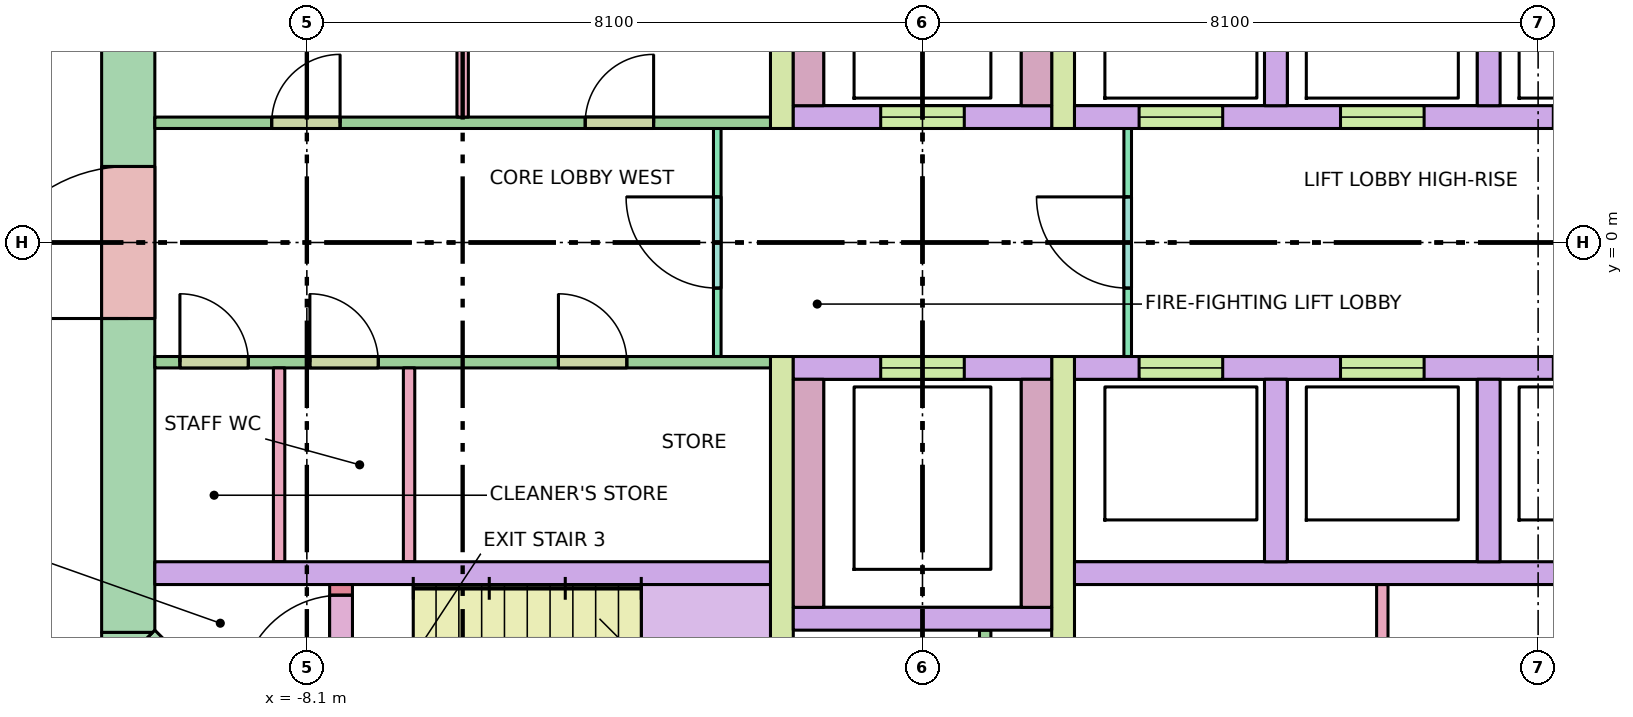
"""IFC4 building model, lengths in metres.
Left out: names, types, materials, properties, quantities, classifications, styles, units other than length and angle.
Written with IfcOpenShell. Run it as: python <this file> out.ifc"""

import sys

from ifc_helpers import new_model, si_unit, direction, frame, frame_2d, origin, place, context, subcontext, project, spatial, polyline, rectangle, outline, extrude, element, fill, save


model = new_model("IFC4")
c1 = context("Model", 3, precision=1e-05, world=origin(), true_north=direction((0.0, 1.0)))
c2 = subcontext(c1, "Body", "Model", "MODEL_VIEW")
j1 = project(units=[si_unit("LENGTHUNIT", "METRE"), si_unit("PLANEANGLEUNIT", "RADIAN")], contexts=[c1])
p1 = place(None, origin())
s1 = spatial("IfcSite", under=j1, at=p1, CompositionType="ELEMENT")
p2 = place(p1, origin())
s2 = spatial("IfcBuilding", under=s1, at=p2, CompositionType="ELEMENT")
p3 = place(p2, frame((0.0, 0.0, 154.2)))
s3 = spatial("IfcBuildingStorey", under=s2, at=p3, CompositionType="ELEMENT", Elevation=154.2)
p4 = place(p3, frame((-10.45, -5.13, -0.28), z_axis=(0.0, 0.0, 1.0), x_axis=(0.0, 1.0, 0.0)))
e1 = element("IfcWall", 1, at=p4, inside=s3, PredefinedType="SHEAR", context=c2, shape_type="SweptSolid", body=[
    extrude(rectangle(XDim=10.26, YDim=0.7, at=frame_2d((5.13, 0.0))), origin(), (0.0, 0.0, 1.0), 3.7),
])
p5 = place(p4, frame((4.13, 0.0, 0.28)))
e2 = element("IfcOpeningElement", 2, at=p5, cuts=e1, PredefinedType="OPENING", context=c2, shape_type="SweptSolid", body=[
    extrude(rectangle(XDim=2.0, YDim=2.1, at=frame_2d((1.0, 1.05))), frame((0.0, 0.36, 0.0), z_axis=(0.0, -1.0, 0.0), x_axis=(1.0, 0.0, 0.0)), (0.0, 0.0, 1.0), 0.72),
])
p6 = place(p3, frame((10.347, -5.347, -0.28), z_axis=(0.0, 0.0, 1.0), x_axis=(-0.707106781187, -0.707106781187, 0.0)))
e3 = element("IfcWall", 3, at=p6, inside=s3, PredefinedType="SHEAR", context=c2, shape_type="SweptSolid", body=[
    extrude(rectangle(XDim=4.243, YDim=0.7, at=frame_2d((2.121, 0.0))), origin(), (0.0, 0.0, 1.0), 3.7),
])
p7 = place(p6, frame((0.52, 0.0, 0.28)))
e4 = element("IfcOpeningElement", 4, at=p7, cuts=e3, PredefinedType="OPENING", context=c2, shape_type="SweptSolid", body=[
    extrude(rectangle(XDim=0.9, YDim=2.1, at=frame_2d((0.45, 1.05))), frame((0.0, 0.36, 0.0), z_axis=(0.0, -1.0, 0.0), x_axis=(1.0, 0.0, 0.0)), (0.0, 0.0, 1.0), 0.72),
])
p8 = place(p3, frame((-7.347, -8.347, -0.28), z_axis=(0.0, 0.0, 1.0), x_axis=(-0.707106781187, 0.707106781187, 0.0)))
e5 = element("IfcWall", 5, at=p8, inside=s3, PredefinedType="SHEAR", context=c2, shape_type="SweptSolid", body=[
    extrude(rectangle(XDim=4.243, YDim=0.7, at=frame_2d((2.121, 0.0))), origin(), (0.0, 0.0, 1.0), 3.7),
])
p9 = place(p8, frame((2.393, 0.0, 0.28)))
e6 = element("IfcOpeningElement", 6, at=p9, cuts=e5, PredefinedType="OPENING", context=c2, shape_type="SweptSolid", body=[
    extrude(rectangle(XDim=1.2, YDim=2.1, at=frame_2d((0.6, 1.05))), frame((0.0, 0.36, 0.0), z_axis=(0.0, -1.0, 0.0), x_axis=(1.0, 0.0, 0.0)), (0.0, 0.0, 1.0), 0.72),
])
p10 = place(p3, frame((0.0, 0.0, -0.28)))
e7 = element("IfcWall", 7, at=p10, inside=s3, PredefinedType="SHEAR", context=c2, shape_type="SweptSolid", body=[
    extrude(outline(polyline([(-10.8, -5.39), (-10.8, -5.13), (-10.8, -5.13), (-10.13, -5.13), (-10.595, -5.595), (-10.595, -5.595), (-10.595, -5.595), (-10.8, -5.39)])), origin(), (0.0, 0.0, 1.0), 3.7),
])
for number, where, z_axis, x_axis in (
    (8, (-10.1, -4.35, 0.0), (0.0, 0.0, 1.0), (1.0, 0.0, 0.0)),
    (9, (2.0, -4.35, 0.0), (0.0, 0.0, 1.0), (1.0, 0.0, 0.0)),
):
    element("IfcWall", number, at=place(p3, frame(where, z_axis=z_axis, x_axis=x_axis)), inside=s3, PredefinedType="SOLIDWALL", context=c2, shape_type="SweptSolid", body=[
        extrude(rectangle(XDim=8.1, YDim=0.3, at=frame_2d((4.05, 0.0))), origin(), (0.0, 0.0, 1.0), 3.42),
    ])
p11 = place(p3, frame((2.0, 1.65, 0.0), z_axis=(0.0, 0.0, 1.0), x_axis=(1.0, 0.0, 0.0)))
e10 = element("IfcWall", 10, at=p11, inside=s3, PredefinedType="SOLIDWALL", context=c2, shape_type="SweptSolid", body=[
    extrude(rectangle(XDim=8.1, YDim=0.3, at=frame_2d((4.05, 0.0))), origin(), (0.0, 0.0, 1.0), 3.42),
])
p12 = place(p11, frame((0.85, 0.0, 0.0)))
e11 = element("IfcOpeningElement", 11, at=p12, cuts=e10, PredefinedType="OPENING", context=c2, shape_type="SweptSolid", body=[
    extrude(rectangle(XDim=1.1, YDim=2.1, at=frame_2d((0.55, 1.05))), frame((0.0, 0.16, 0.0), z_axis=(0.0, -1.0, 0.0), x_axis=(1.0, 0.0, 0.0)), (0.0, 0.0, 1.0), 0.32),
])
p13 = place(p11, frame((3.5, 0.0, 0.0)))
e12 = element("IfcOpeningElement", 12, at=p13, cuts=e10, PredefinedType="OPENING", context=c2, shape_type="SweptSolid", body=[
    extrude(rectangle(XDim=1.1, YDim=2.1, at=frame_2d((0.55, 1.05))), frame((0.0, 0.16, 0.0), z_axis=(0.0, -1.0, 0.0), x_axis=(1.0, 0.0, 0.0)), (0.0, 0.0, 1.0), 0.32),
])
p14 = place(p11, frame((6.3, 0.0, 0.0)))
e13 = element("IfcOpeningElement", 13, at=p14, cuts=e10, PredefinedType="OPENING", context=c2, shape_type="SweptSolid", body=[
    extrude(rectangle(XDim=1.1, YDim=2.1, at=frame_2d((0.55, 1.05))), frame((0.0, 0.16, 0.0), z_axis=(0.0, -1.0, 0.0), x_axis=(1.0, 0.0, 0.0)), (0.0, 0.0, 1.0), 0.32),
])
p15 = place(p3, frame((2.0, -1.65, 0.0), z_axis=(0.0, 0.0, 1.0), x_axis=(1.0, 0.0, 0.0)))
e14 = element("IfcWall", 14, at=p15, inside=s3, PredefinedType="SOLIDWALL", context=c2, shape_type="SweptSolid", body=[
    extrude(rectangle(XDim=8.1, YDim=0.3, at=frame_2d((4.05, 0.0))), origin(), (0.0, 0.0, 1.0), 3.42),
])
p16 = place(p15, frame((0.85, 0.0, 0.0)))
e15 = element("IfcOpeningElement", 15, at=p16, cuts=e14, PredefinedType="OPENING", context=c2, shape_type="SweptSolid", body=[
    extrude(rectangle(XDim=1.1, YDim=2.1, at=frame_2d((0.55, 1.05))), frame((0.0, 0.16, 0.0), z_axis=(0.0, -1.0, 0.0), x_axis=(1.0, 0.0, 0.0)), (0.0, 0.0, 1.0), 0.32),
])
p17 = place(p15, frame((3.5, 0.0, 0.0)))
e16 = element("IfcOpeningElement", 16, at=p17, cuts=e14, PredefinedType="OPENING", context=c2, shape_type="SweptSolid", body=[
    extrude(rectangle(XDim=1.1, YDim=2.1, at=frame_2d((0.55, 1.05))), frame((0.0, 0.16, 0.0), z_axis=(0.0, -1.0, 0.0), x_axis=(1.0, 0.0, 0.0)), (0.0, 0.0, 1.0), 0.32),
])
p18 = place(p15, frame((6.3, 0.0, 0.0)))
e17 = element("IfcOpeningElement", 17, at=p18, cuts=e14, PredefinedType="OPENING", context=c2, shape_type="SweptSolid", body=[
    extrude(rectangle(XDim=1.1, YDim=2.1, at=frame_2d((0.55, 1.05))), frame((0.0, 0.16, 0.0), z_axis=(0.0, -1.0, 0.0), x_axis=(1.0, 0.0, 0.0)), (0.0, 0.0, 1.0), 0.32),
])
for number, where, z_axis, x_axis in (
    (18, (4.65, 1.8, 0.0), (0.0, 0.0, 1.0), (0.0, 1.0, 0.0)),
    (19, (4.65, -4.2, 0.0), (0.0, 0.0, 1.0), (0.0, 1.0, 0.0)),
    (20, (7.45, 1.8, 0.0), (0.0, 0.0, 1.0), (0.0, 1.0, 0.0)),
    (21, (7.45, -4.2, 0.0), (0.0, 0.0, 1.0), (0.0, 1.0, 0.0)),
):
    element("IfcWall", number, at=place(p3, frame(where, z_axis=z_axis, x_axis=x_axis)), inside=s3, PredefinedType="SOLIDWALL", context=c2, shape_type="SweptSolid", body=[
        extrude(rectangle(XDim=2.4, YDim=0.3, at=frame_2d((1.2, 0.0))), origin(), (0.0, 0.0, 1.0), 3.42),
    ])
for number, where, z_axis, x_axis in (
    (22, (-1.85, 1.5, 0.0), (0.0, 0.0, 1.0), (0.0, 1.0, 0.0)),
    (23, (-1.85, -8.1, 0.0), (0.0, 0.0, 1.0), (0.0, 1.0, 0.0)),
    (24, (1.85, 1.5, 0.0), (0.0, 0.0, 1.0), (0.0, 1.0, 0.0)),
    (25, (1.85, -8.1, 0.0), (0.0, 0.0, 1.0), (0.0, 1.0, 0.0)),
):
    element("IfcWall", number, at=place(p3, frame(where, z_axis=z_axis, x_axis=x_axis)), inside=s3, PredefinedType="SHEAR", context=c2, shape_type="SweptSolid", body=[
        extrude(rectangle(XDim=6.6, YDim=0.3, at=frame_2d((3.3, 0.0))), origin(), (0.0, 0.0, 1.0), 3.42),
    ])
p19 = place(p3, frame((-1.7, 1.65, 0.0), z_axis=(0.0, 0.0, 1.0), x_axis=(1.0, 0.0, 0.0)))
e26 = element("IfcWall", 26, at=p19, inside=s3, PredefinedType="SOLIDWALL", context=c2, shape_type="SweptSolid", body=[
    extrude(rectangle(XDim=3.4, YDim=0.3, at=frame_2d((1.7, 0.0))), origin(), (0.0, 0.0, 1.0), 3.42),
])
p20 = place(p19, frame((1.15, 0.0, 0.0)))
e27 = element("IfcOpeningElement", 27, at=p20, cuts=e26, PredefinedType="OPENING", context=c2, shape_type="SweptSolid", body=[
    extrude(rectangle(XDim=1.1, YDim=2.1, at=frame_2d((0.55, 1.05))), frame((0.0, 0.16, 0.0), z_axis=(0.0, -1.0, 0.0), x_axis=(1.0, 0.0, 0.0)), (0.0, 0.0, 1.0), 0.32),
])
p21 = place(p3, frame((-1.7, -1.65, 0.0), z_axis=(0.0, 0.0, 1.0), x_axis=(1.0, 0.0, 0.0)))
e28 = element("IfcWall", 28, at=p21, inside=s3, PredefinedType="SOLIDWALL", context=c2, shape_type="SweptSolid", body=[
    extrude(rectangle(XDim=3.4, YDim=0.3, at=frame_2d((1.7, 0.0))), origin(), (0.0, 0.0, 1.0), 3.42),
])
p22 = place(p21, frame((1.15, 0.0, 0.0)))
e29 = element("IfcOpeningElement", 29, at=p22, cuts=e28, PredefinedType="OPENING", context=c2, shape_type="SweptSolid", body=[
    extrude(rectangle(XDim=1.1, YDim=2.1, at=frame_2d((0.55, 1.05))), frame((0.0, 0.16, 0.0), z_axis=(0.0, -1.0, 0.0), x_axis=(1.0, 0.0, 0.0)), (0.0, 0.0, 1.0), 0.32),
])
for number, where, z_axis, x_axis in (
    (30, (-1.5, 1.8, 0.0), (0.0, 0.0, 1.0), (0.0, 1.0, 0.0)),
    (31, (-1.5, -4.8, 0.0), (0.0, 0.0, 1.0), (0.0, 1.0, 0.0)),
    (32, (1.5, 1.8, 0.0), (0.0, 0.0, 1.0), (0.0, 1.0, 0.0)),
    (33, (1.5, -4.8, 0.0), (0.0, 0.0, 1.0), (0.0, 1.0, 0.0)),
):
    element("IfcWall", number, at=place(p3, frame(where, z_axis=z_axis, x_axis=x_axis)), inside=s3, PredefinedType="SOLIDWALL", context=c2, shape_type="SweptSolid", body=[
        extrude(rectangle(XDim=3.0, YDim=0.4, at=frame_2d((1.5, 0.0))), origin(), (0.0, 0.0, 1.0), 3.42),
    ])
p23 = place(p3, frame((-1.7, -4.95, 0.0), z_axis=(0.0, 0.0, 1.0), x_axis=(1.0, 0.0, 0.0)))
e34 = element("IfcWall", 34, at=p23, inside=s3, PredefinedType="SOLIDWALL", context=c2, shape_type="SweptSolid", body=[
    extrude(rectangle(XDim=3.4, YDim=0.3, at=frame_2d((1.7, 0.0))), origin(), (0.0, 0.0, 1.0), 3.42),
])
p24 = place(p3, frame((-7.65, -7.64, 0.0), z_axis=(0.0, 0.0, 1.0), x_axis=(0.0, 1.0, 0.0)))
e35 = element("IfcWall", 35, at=p24, inside=s3, PredefinedType="SHEAR", context=c2, shape_type="SweptSolid", body=[
    extrude(rectangle(XDim=3.14, YDim=0.3, at=frame_2d((1.57, 0.0))), origin(), (0.0, 0.0, 1.0), 3.42),
])
p25 = place(p24, frame((1.68, 0.0, 0.0)))
e36 = element("IfcOpeningElement", 36, at=p25, cuts=e35, PredefinedType="OPENING", context=c2, shape_type="SweptSolid", body=[
    extrude(rectangle(XDim=1.32, YDim=2.1, at=frame_2d((0.66, 1.05))), frame((0.0, 0.16, 0.0), z_axis=(0.0, -1.0, 0.0), x_axis=(1.0, 0.0, 0.0)), (0.0, 0.0, 1.0), 0.32),
])
p26 = place(p3, frame((-2.7, -1.5, 0.0), z_axis=(0.0, 0.0, 1.0), x_axis=(0.0, 1.0, 0.0)))
e37 = element("IfcWall", 37, at=p26, inside=s3, PredefinedType="PARTITIONING", context=c2, shape_type="SweptSolid", body=[
    extrude(rectangle(XDim=3.0, YDim=0.1, at=frame_2d((1.5, 0.0))), origin(), (0.0, 0.0, 1.0), 3.42),
])
p27 = place(p26, frame((0.9, 0.0, 0.0)))
e38 = element("IfcOpeningElement", 38, at=p27, cuts=e37, PredefinedType="OPENING", context=c2, shape_type="SweptSolid", body=[
    extrude(rectangle(XDim=1.2, YDim=2.1, at=frame_2d((0.6, 1.05))), frame((0.0, 0.06, 0.0), z_axis=(0.0, -1.0, 0.0), x_axis=(1.0, 0.0, 0.0)), (0.0, 0.0, 1.0), 0.12),
])
p28 = place(p3, frame((2.7, -1.5, 0.0), z_axis=(0.0, 0.0, 1.0), x_axis=(0.0, 1.0, 0.0)))
e39 = element("IfcWall", 39, at=p28, inside=s3, PredefinedType="PARTITIONING", context=c2, shape_type="SweptSolid", body=[
    extrude(rectangle(XDim=3.0, YDim=0.1, at=frame_2d((1.5, 0.0))), origin(), (0.0, 0.0, 1.0), 3.42),
])
p29 = place(p28, frame((0.9, 0.0, 0.0)))
e40 = element("IfcOpeningElement", 40, at=p29, cuts=e39, PredefinedType="OPENING", context=c2, shape_type="SweptSolid", body=[
    extrude(rectangle(XDim=1.2, YDim=2.1, at=frame_2d((0.6, 1.05))), frame((0.0, 0.06, 0.0), z_axis=(0.0, -1.0, 0.0), x_axis=(1.0, 0.0, 0.0)), (0.0, 0.0, 1.0), 0.12),
])
p30 = place(p3, frame((0.825, -8.1, 0.0), z_axis=(0.0, 0.0, 1.0), x_axis=(0.0, 1.0, 0.0)))
e41 = element("IfcWall", 41, at=p30, inside=s3, PredefinedType="PARTITIONING", context=c2, shape_type="SweptSolid", body=[
    extrude(rectangle(XDim=3.0, YDim=0.15, at=frame_2d((1.5, 0.0))), origin(), (0.0, 0.0, 1.0), 3.42),
])
p31 = place(p3, frame((6.05, -8.1, 0.0), z_axis=(0.0, 0.0, 1.0), x_axis=(0.0, 1.0, 0.0)))
e42 = element("IfcWall", 42, at=p31, inside=s3, PredefinedType="PARTITIONING", context=c2, shape_type="SweptSolid", body=[
    extrude(rectangle(XDim=3.6, YDim=0.15, at=frame_2d((1.8, 0.0))), origin(), (0.0, 0.0, 1.0), 3.42),
])
for number, where, z_axis, x_axis in (
    (43, (-6.05, 1.65, 0.0), (0.0, 0.0, 1.0), (0.0, 1.0, 0.0)),
    (44, (-8.465, -4.2, 0.0), (0.0, 0.0, 1.0), (0.0, 1.0, 0.0)),
    (45, (-6.755, -4.2, 0.0), (0.0, 0.0, 1.0), (0.0, 1.0, 0.0)),
):
    element("IfcWall", number, at=place(p3, frame(where, z_axis=z_axis, x_axis=x_axis)), inside=s3, PredefinedType="PARTITIONING", context=c2, shape_type="SweptSolid", body=[
        extrude(rectangle(XDim=2.55, YDim=0.15, at=frame_2d((1.275, 0.0))), origin(), (0.0, 0.0, 1.0), 3.42),
    ])
p32 = place(p3, frame((-10.1, 1.575, 0.0), z_axis=(0.0, 0.0, 1.0), x_axis=(1.0, 0.0, 0.0)))
e46 = element("IfcWall", 46, at=p32, inside=s3, PredefinedType="PARTITIONING", context=c2, shape_type="SweptSolid", body=[
    extrude(rectangle(XDim=8.1, YDim=0.15, at=frame_2d((4.05, 0.0))), origin(), (0.0, 0.0, 1.0), 3.42),
])
p33 = place(p32, frame((1.538, 0.0, 0.0)))
e47 = element("IfcOpeningElement", 47, at=p33, cuts=e46, PredefinedType="OPENING", context=c2, shape_type="SweptSolid", body=[
    extrude(rectangle(XDim=0.9, YDim=2.1, at=frame_2d((0.45, 1.05))), frame((0.0, 0.085, 0.0), z_axis=(0.0, -1.0, 0.0), x_axis=(1.0, 0.0, 0.0)), (0.0, 0.0, 1.0), 0.17),
])
p34 = place(p32, frame((5.663, 0.0, 0.0)))
e48 = element("IfcOpeningElement", 48, at=p34, cuts=e46, PredefinedType="OPENING", context=c2, shape_type="SweptSolid", body=[
    extrude(rectangle(XDim=0.9, YDim=2.1, at=frame_2d((0.45, 1.05))), frame((0.0, 0.085, 0.0), z_axis=(0.0, -1.0, 0.0), x_axis=(1.0, 0.0, 0.0)), (0.0, 0.0, 1.0), 0.17),
])
p35 = place(p3, frame((-10.1, -1.575, 0.0), z_axis=(0.0, 0.0, 1.0), x_axis=(1.0, 0.0, 0.0)))
e49 = element("IfcWall", 49, at=p35, inside=s3, PredefinedType="PARTITIONING", context=c2, shape_type="SweptSolid", body=[
    extrude(rectangle(XDim=8.1, YDim=0.15, at=frame_2d((4.05, 0.0))), origin(), (0.0, 0.0, 1.0), 3.42),
])
p36 = place(p35, frame((0.33, 0.0, 0.0)))
e50 = element("IfcOpeningElement", 50, at=p36, cuts=e49, PredefinedType="OPENING", context=c2, shape_type="SweptSolid", body=[
    extrude(rectangle(XDim=0.9, YDim=2.1, at=frame_2d((0.45, 1.05))), frame((0.0, 0.085, 0.0), z_axis=(0.0, -1.0, 0.0), x_axis=(1.0, 0.0, 0.0)), (0.0, 0.0, 1.0), 0.17),
])
p37 = place(p35, frame((2.04, 0.0, 0.0)))
e51 = element("IfcOpeningElement", 51, at=p37, cuts=e49, PredefinedType="OPENING", context=c2, shape_type="SweptSolid", body=[
    extrude(rectangle(XDim=0.9, YDim=2.1, at=frame_2d((0.45, 1.05))), frame((0.0, 0.085, 0.0), z_axis=(0.0, -1.0, 0.0), x_axis=(1.0, 0.0, 0.0)), (0.0, 0.0, 1.0), 0.17),
])
p38 = place(p35, frame((5.31, 0.0, 0.0)))
e52 = element("IfcOpeningElement", 52, at=p38, cuts=e49, PredefinedType="OPENING", context=c2, shape_type="SweptSolid", body=[
    extrude(rectangle(XDim=0.9, YDim=2.1, at=frame_2d((0.45, 1.05))), frame((0.0, 0.085, 0.0), z_axis=(0.0, -1.0, 0.0), x_axis=(1.0, 0.0, 0.0)), (0.0, 0.0, 1.0), 0.17),
])
p39 = place(p12, origin())
e53 = element("IfcDoor", 53, at=p39, inside=s3, OperationType="DOUBLE_DOOR_SLIDING", PredefinedType="DOOR", context=c2, shape_type="SweptSolid", body=[
    extrude(rectangle(XDim=1.1, YDim=2.1, at=frame_2d((0.55, 1.05))), frame((0.0, 0.025, 0.0), z_axis=(0.0, -1.0, 0.0), x_axis=(1.0, 0.0, 0.0)), (0.0, 0.0, 1.0), 0.05),
])
fill(e11, e53)
p40 = place(p13, origin())
e54 = element("IfcDoor", 54, at=p40, inside=s3, OperationType="DOUBLE_DOOR_SLIDING", PredefinedType="DOOR", context=c2, shape_type="SweptSolid", body=[
    extrude(rectangle(XDim=1.1, YDim=2.1, at=frame_2d((0.55, 1.05))), frame((0.0, 0.025, 0.0), z_axis=(0.0, -1.0, 0.0), x_axis=(1.0, 0.0, 0.0)), (0.0, 0.0, 1.0), 0.05),
])
fill(e12, e54)
p41 = place(p16, origin())
e55 = element("IfcDoor", 55, at=p41, inside=s3, OperationType="DOUBLE_DOOR_SLIDING", PredefinedType="DOOR", context=c2, shape_type="SweptSolid", body=[
    extrude(rectangle(XDim=1.1, YDim=2.1, at=frame_2d((0.55, 1.05))), frame((0.0, 0.025, 0.0), z_axis=(0.0, -1.0, 0.0), x_axis=(1.0, 0.0, 0.0)), (0.0, 0.0, 1.0), 0.05),
])
fill(e15, e55)
p42 = place(p17, origin())
e56 = element("IfcDoor", 56, at=p42, inside=s3, OperationType="DOUBLE_DOOR_SLIDING", PredefinedType="DOOR", context=c2, shape_type="SweptSolid", body=[
    extrude(rectangle(XDim=1.1, YDim=2.1, at=frame_2d((0.55, 1.05))), frame((0.0, 0.025, 0.0), z_axis=(0.0, -1.0, 0.0), x_axis=(1.0, 0.0, 0.0)), (0.0, 0.0, 1.0), 0.05),
])
fill(e16, e56)
p43 = place(p20, origin())
e57 = element("IfcDoor", 57, at=p43, inside=s3, OperationType="DOUBLE_DOOR_SLIDING", PredefinedType="DOOR", context=c2, shape_type="SweptSolid", body=[
    extrude(rectangle(XDim=1.1, YDim=2.1, at=frame_2d((0.55, 1.05))), frame((0.0, 0.025, 0.0), z_axis=(0.0, -1.0, 0.0), x_axis=(1.0, 0.0, 0.0)), (0.0, 0.0, 1.0), 0.05),
])
fill(e27, e57)
p44 = place(p22, origin())
e58 = element("IfcDoor", 58, at=p44, inside=s3, OperationType="DOUBLE_DOOR_SLIDING", PredefinedType="DOOR", context=c2, shape_type="SweptSolid", body=[
    extrude(rectangle(XDim=1.1, YDim=2.1, at=frame_2d((0.55, 1.05))), frame((0.0, 0.025, 0.0), z_axis=(0.0, -1.0, 0.0), x_axis=(1.0, 0.0, 0.0)), (0.0, 0.0, 1.0), 0.05),
])
fill(e29, e58)
p45 = place(p25, origin())
e59 = element("IfcDoor", 59, at=p45, inside=s3, OperationType="DOUBLE_DOOR_SINGLE_SWING", PredefinedType="DOOR", context=c2, shape_type="SweptSolid", body=[
    extrude(rectangle(XDim=1.32, YDim=2.1, at=frame_2d((0.66, 1.05))), frame((0.0, 0.025, 0.0), z_axis=(0.0, -1.0, 0.0), x_axis=(1.0, 0.0, 0.0)), (0.0, 0.0, 1.0), 0.05),
])
fill(e36, e59)
p46 = place(p5, origin())
e60 = element("IfcDoor", 60, at=p46, inside=s3, OperationType="DOUBLE_DOOR_SINGLE_SWING", PredefinedType="DOOR", context=c2, shape_type="SweptSolid", body=[
    extrude(rectangle(XDim=2.0, YDim=2.1, at=frame_2d((1.0, 1.05))), frame((0.0, 0.025, 0.0), z_axis=(0.0, -1.0, 0.0), x_axis=(1.0, 0.0, 0.0)), (0.0, 0.0, 1.0), 0.05),
])
fill(e2, e60)
p47 = place(p27, origin())
e61 = element("IfcDoor", 61, at=p47, inside=s3, OperationType="SINGLE_SWING_RIGHT", PredefinedType="DOOR", context=c2, shape_type="SweptSolid", body=[
    extrude(rectangle(XDim=1.2, YDim=2.1, at=frame_2d((0.6, 1.05))), frame((0.0, 0.025, 0.0), z_axis=(0.0, -1.0, 0.0), x_axis=(1.0, 0.0, 0.0)), (0.0, 0.0, 1.0), 0.05),
])
fill(e38, e61)
p48 = place(p29, origin())
e62 = element("IfcDoor", 62, at=p48, inside=s3, OperationType="SINGLE_SWING_RIGHT", PredefinedType="DOOR", context=c2, shape_type="SweptSolid", body=[
    extrude(rectangle(XDim=1.2, YDim=2.1, at=frame_2d((0.6, 1.05))), frame((0.0, 0.025, 0.0), z_axis=(0.0, -1.0, 0.0), x_axis=(1.0, 0.0, 0.0)), (0.0, 0.0, 1.0), 0.05),
])
fill(e40, e62)
p49 = place(p33, origin())
e63 = element("IfcDoor", 63, at=p49, inside=s3, OperationType="SINGLE_SWING_RIGHT", PredefinedType="DOOR", context=c2, shape_type="SweptSolid", body=[
    extrude(rectangle(XDim=0.9, YDim=2.1, at=frame_2d((0.45, 1.05))), frame((0.0, 0.025, 0.0), z_axis=(0.0, -1.0, 0.0), x_axis=(1.0, 0.0, 0.0)), (0.0, 0.0, 1.0), 0.05),
])
fill(e47, e63)
p50 = place(p34, origin())
e64 = element("IfcDoor", 64, at=p50, inside=s3, OperationType="SINGLE_SWING_RIGHT", PredefinedType="DOOR", context=c2, shape_type="SweptSolid", body=[
    extrude(rectangle(XDim=0.9, YDim=2.1, at=frame_2d((0.45, 1.05))), frame((0.0, 0.025, 0.0), z_axis=(0.0, -1.0, 0.0), x_axis=(1.0, 0.0, 0.0)), (0.0, 0.0, 1.0), 0.05),
])
fill(e48, e64)
p51 = place(p36, origin())
e65 = element("IfcDoor", 65, at=p51, inside=s3, OperationType="SINGLE_SWING_LEFT", PredefinedType="DOOR", context=c2, shape_type="SweptSolid", body=[
    extrude(rectangle(XDim=0.9, YDim=2.1, at=frame_2d((0.45, 1.05))), frame((0.0, 0.025, 0.0), z_axis=(0.0, -1.0, 0.0), x_axis=(1.0, 0.0, 0.0)), (0.0, 0.0, 1.0), 0.05),
])
fill(e50, e65)
p52 = place(p37, origin())
e66 = element("IfcDoor", 66, at=p52, inside=s3, OperationType="SINGLE_SWING_LEFT", PredefinedType="DOOR", context=c2, shape_type="SweptSolid", body=[
    extrude(rectangle(XDim=0.9, YDim=2.1, at=frame_2d((0.45, 1.05))), frame((0.0, 0.025, 0.0), z_axis=(0.0, -1.0, 0.0), x_axis=(1.0, 0.0, 0.0)), (0.0, 0.0, 1.0), 0.05),
])
fill(e51, e66)
p53 = place(p38, origin())
e67 = element("IfcDoor", 67, at=p53, inside=s3, OperationType="SINGLE_SWING_LEFT", PredefinedType="DOOR", context=c2, shape_type="SweptSolid", body=[
    extrude(rectangle(XDim=0.9, YDim=2.1, at=frame_2d((0.45, 1.05))), frame((0.0, 0.025, 0.0), z_axis=(0.0, -1.0, 0.0), x_axis=(1.0, 0.0, 0.0)), (0.0, 0.0, 1.0), 0.05),
])
fill(e52, e67)
save(model, sys.argv[1])
